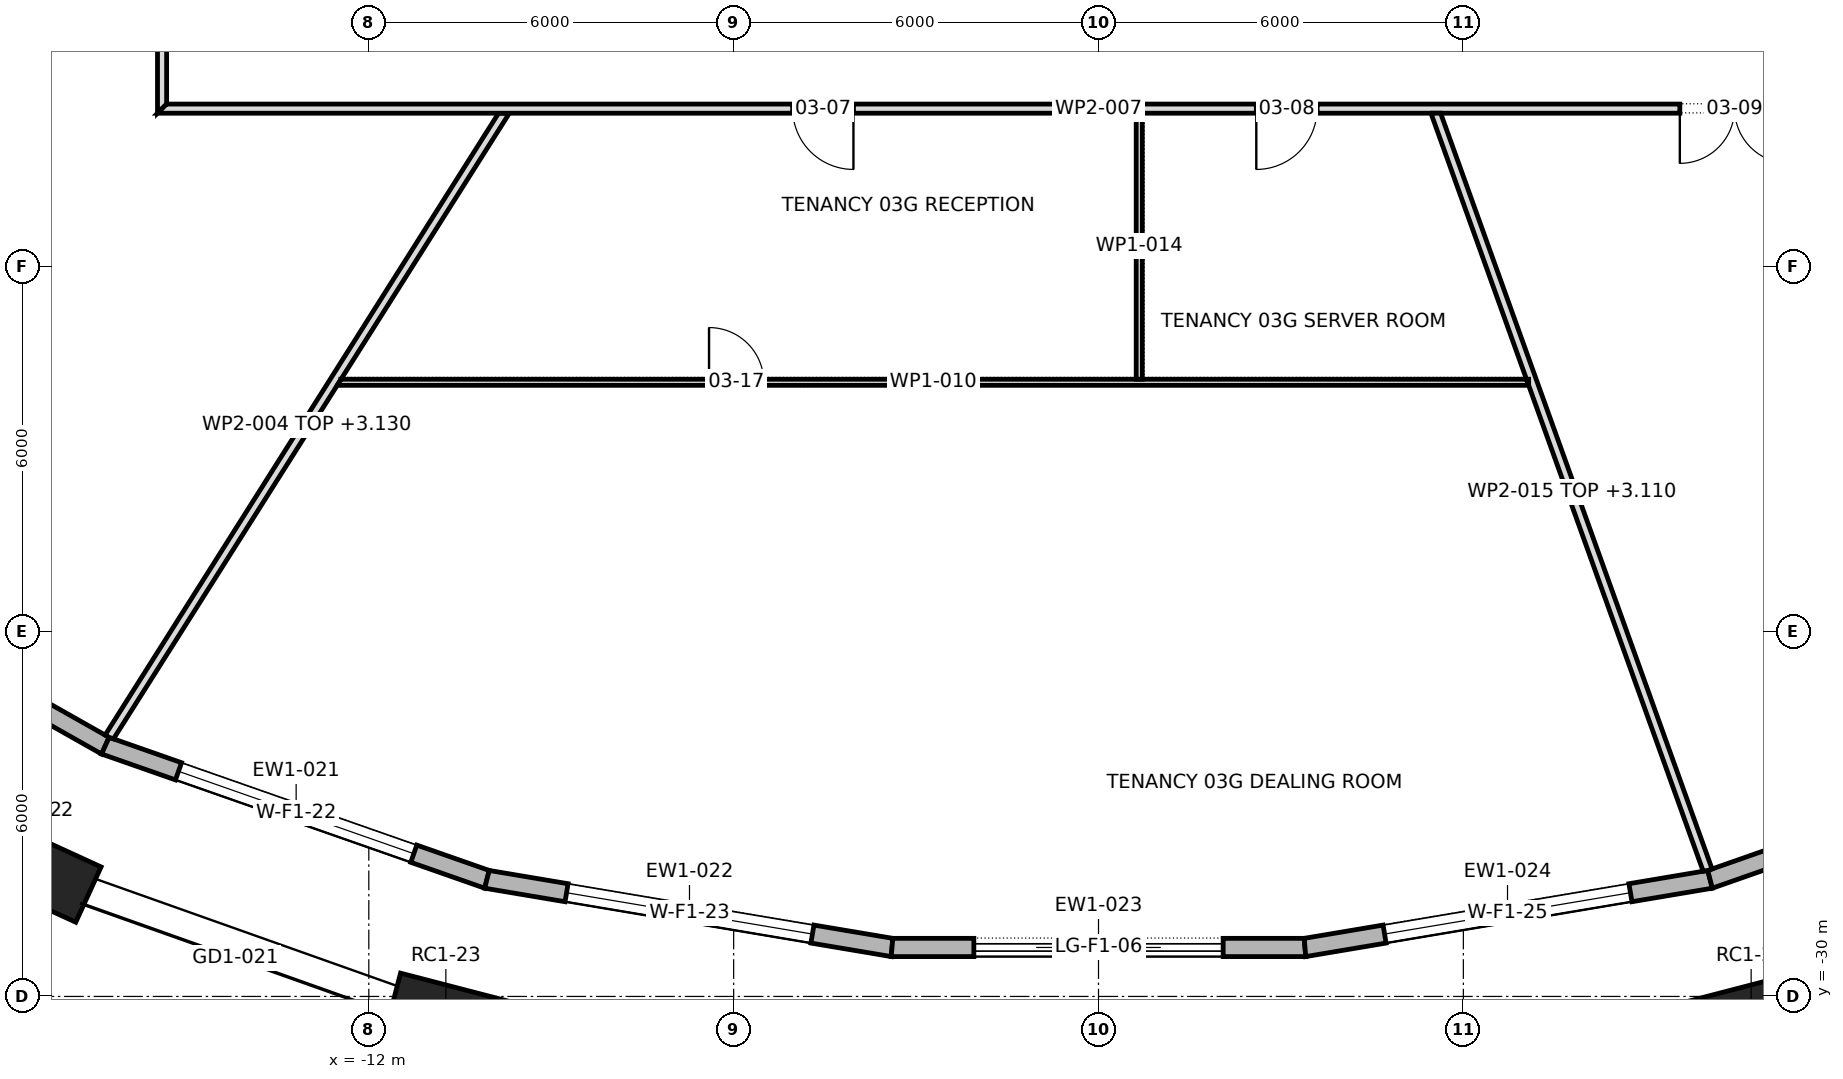
"""IFC4 building model, lengths in metres.
Left out: names, types, materials, properties, quantities, classifications, styles, units other than length and angle.
Written with IfcOpenShell. Run it as: python <this file> out.ifc"""

import sys

from ifc_helpers import new_model, si_unit, direction, frame, frame_2d, origin, origin_2d, place, context, subcontext, project, spatial, polyline, rectangle, outline, extrude, element, fill, save


model = new_model("IFC4")
c1 = context("Model", 3, precision=1e-05, world=origin(), true_north=direction((0.0, 1.0)))
c2 = subcontext(c1, "Body", "Model", "MODEL_VIEW")
j1 = project(units=[si_unit("LENGTHUNIT", "METRE"), si_unit("PLANEANGLEUNIT", "RADIAN")], contexts=[c1])
p1 = place(None, origin())
s1 = spatial("IfcSite", under=j1, at=p1, CompositionType="ELEMENT")
p2 = place(p1, origin())
s2 = spatial("IfcBuilding", under=s1, at=p2, CompositionType="ELEMENT")
p3 = place(p2, frame((0.0, 0.0, 57.1)))
s3 = spatial("IfcBuildingStorey", under=s2, at=p3, CompositionType="ELEMENT", Elevation=57.1)
for number, where, z_axis, x_axis in (
    (1, (-17.429, -27.95, 0.0), (0.0, 0.0, 1.0), (0.909, -0.417, 0.0)),
    (2, (-10.733, -30.327, 0.0), (0.0, 0.0, 1.0), (0.968, -0.252, 0.0)),
    (3, (10.733, -30.327, 0.0), (0.0, 0.0, 1.0), (0.968, 0.252, 0.0)),
):
    element("IfcColumn", number, at=place(p3, frame(where, z_axis=z_axis, x_axis=x_axis)), inside=s3, PredefinedType="COLUMN", context=c2, shape_type="SweptSolid", body=[
        extrude(rectangle(XDim=1.8, YDim=1.0, at=origin_2d()), origin(), (0.0, 0.0, 1.0), 4.2),
    ])
p4 = place(p3, frame((-21.983, -22.684, 0.0), z_axis=(0.0, 0.0, 1.0), x_axis=(0.870647609977, -0.491907246584, 0.0)))
e4 = element("IfcWall", 4, at=p4, inside=s3, PredefinedType="STANDARD", context=c2, shape_type="SweptSolid", body=[
    extrude(outline(polyline([(-0.014, -0.15), (6.503, -0.15), (6.476, 0.15), (0.014, 0.15), (-0.014, -0.15)])), origin(), (0.0, 0.0, 1.0), 3.9),
])
p5 = place(p4, frame((1.195, 0.0, 0.6)))
e5 = element("IfcOpeningElement", 5, at=p5, cuts=e4, PredefinedType="OPENING", context=c2, shape_type="SweptSolid", body=[
    extrude(rectangle(XDim=4.1, YDim=2.85, at=frame_2d((2.05, 1.425))), frame((0.0, 0.162, 0.0), z_axis=(0.0, -1.0, 0.0), x_axis=(1.0, 0.0, 0.0)), (0.0, 0.0, 1.0), 0.324),
])
p6 = place(p3, frame((-16.333, -25.876, 0.0), z_axis=(0.0, 0.0, 1.0), x_axis=(0.943790794479, -0.330543395421, 0.0)))
e6 = element("IfcWall", 6, at=p6, inside=s3, PredefinedType="STANDARD", context=c2, shape_type="SweptSolid", body=[
    extrude(outline(polyline([(-0.013, -0.15), (6.662, -0.15), (6.637, 0.15), (0.013, 0.15), (-0.013, -0.15)])), origin(), (0.0, 0.0, 1.0), 3.9),
])
p7 = place(p6, frame((1.275, 0.0, 0.6)))
e7 = element("IfcOpeningElement", 7, at=p7, cuts=e6, PredefinedType="OPENING", context=c2, shape_type="SweptSolid", body=[
    extrude(rectangle(XDim=4.1, YDim=2.85, at=frame_2d((2.05, 1.425))), frame((0.0, 0.162, 0.0), z_axis=(0.0, -1.0, 0.0), x_axis=(1.0, 0.0, 0.0)), (0.0, 0.0, 1.0), 0.324),
])
p8 = place(p3, frame((-10.057, -28.074, 0.0), z_axis=(0.0, 0.0, 1.0), x_axis=(0.986149614624, -0.165858185139, 0.0)))
e8 = element("IfcWall", 8, at=p8, inside=s3, PredefinedType="STANDARD", context=c2, shape_type="SweptSolid", body=[
    extrude(outline(polyline([(-0.013, -0.15), (6.767, -0.15), (6.742, 0.15), (0.013, 0.15), (-0.013, -0.15)])), origin(), (0.0, 0.0, 1.0), 3.9),
])
p9 = place(p8, frame((1.327, 0.0, 0.6)))
e9 = element("IfcOpeningElement", 9, at=p9, cuts=e8, PredefinedType="OPENING", context=c2, shape_type="SweptSolid", body=[
    extrude(rectangle(XDim=4.1, YDim=2.85, at=frame_2d((2.05, 1.425))), frame((0.0, 0.162, 0.0), z_axis=(0.0, -1.0, 0.0), x_axis=(1.0, 0.0, 0.0)), (0.0, 0.0, 1.0), 0.324),
])
p10 = place(p3, frame((-3.396, -29.195, 0.0), z_axis=(0.0, 0.0, 1.0), x_axis=(1.0, 0.0, 0.0)))
e10 = element("IfcWall", 10, at=p10, inside=s3, PredefinedType="STANDARD", context=c2, shape_type="SweptSolid", body=[
    extrude(outline(polyline([(-0.012, -0.15), (6.803, -0.15), (6.779, 0.15), (0.012, 0.15), (-0.012, -0.15)])), origin(), (0.0, 0.0, 1.0), 3.9),
])
p11 = place(p10, frame((1.346, 0.0, 0.0)))
e11 = element("IfcOpeningElement", 11, at=p11, cuts=e10, PredefinedType="OPENING", context=c2, shape_type="SweptSolid", body=[
    extrude(rectangle(XDim=4.1, YDim=3.45, at=frame_2d((2.05, 1.725))), frame((0.0, 0.162, 0.0), z_axis=(0.0, -1.0, 0.0), x_axis=(1.0, 0.0, 0.0)), (0.0, 0.0, 1.0), 0.324),
])
p12 = place(p3, frame((3.396, -29.195, 0.0), z_axis=(0.0, 0.0, 1.0), x_axis=(0.986149614624, 0.165858185139, 0.0)))
e12 = element("IfcWall", 12, at=p12, inside=s3, PredefinedType="STANDARD", context=c2, shape_type="SweptSolid", body=[
    extrude(outline(polyline([(-0.012, -0.15), (6.768, -0.15), (6.742, 0.15), (0.012, 0.15), (-0.012, -0.15)])), origin(), (0.0, 0.0, 1.0), 3.9),
])
p13 = place(p12, frame((1.327, 0.0, 0.6)))
e13 = element("IfcOpeningElement", 13, at=p13, cuts=e12, PredefinedType="OPENING", context=c2, shape_type="SweptSolid", body=[
    extrude(rectangle(XDim=4.1, YDim=2.85, at=frame_2d((2.05, 1.425))), frame((0.0, 0.162, 0.0), z_axis=(0.0, -1.0, 0.0), x_axis=(1.0, 0.0, 0.0)), (0.0, 0.0, 1.0), 0.324),
])
p14 = place(p3, frame((10.057, -28.074, 0.0), z_axis=(0.0, 0.0, 1.0), x_axis=(0.943790794479, 0.330543395421, 0.0)))
e14 = element("IfcWall", 14, at=p14, inside=s3, PredefinedType="STANDARD", context=c2, shape_type="SweptSolid", body=[
    extrude(outline(polyline([(-0.013, -0.15), (6.663, -0.15), (6.636, 0.15), (0.013, 0.15), (-0.013, -0.15)])), origin(), (0.0, 0.0, 1.0), 3.9),
])
p15 = place(p14, frame((1.275, 0.0, 0.6)))
e15 = element("IfcOpeningElement", 15, at=p15, cuts=e14, PredefinedType="OPENING", context=c2, shape_type="SweptSolid", body=[
    extrude(rectangle(XDim=4.1, YDim=2.85, at=frame_2d((2.05, 1.425))), frame((0.0, 0.162, 0.0), z_axis=(0.0, -1.0, 0.0), x_axis=(1.0, 0.0, 0.0)), (0.0, 0.0, 1.0), 0.324),
])
p16 = place(p3, frame((-16.273, -25.742, 0.0), z_axis=(0.0, 0.0, 1.0), x_axis=(0.534654841392, 0.845070529942, 0.0)))
e16 = element("IfcWall", 16, at=p16, inside=s3, PredefinedType="PARTITIONING", context=c2, shape_type="SweptSolid", body=[
    extrude(outline(polyline([(0.021, -0.075), (1.769, -0.075), (3.517, -0.075), (5.265, -0.075), (7.013, -0.075), (7.018, -0.072), (7.019, -0.075), (8.745, -0.075), (10.471, -0.075), (12.196, -0.075), (12.196, -0.075), (12.102, 0.075), (10.373, 0.075), (8.644, 0.075), (6.915, 0.075), (5.186, 0.075), (3.458, 0.075), (1.729, 0.075), (0.0, 0.075), (0.0, 0.071), (0.004, -0.0), (0.021, -0.075)])), origin(), (0.0, 0.0, 1.0), 3.13),
])
p17 = place(p3, frame((-15.4, -15.475, 0.0), z_axis=(0.0, 0.0, 1.0), x_axis=(0.0, 1.0, 0.0)))
e17 = element("IfcWall", 17, at=p17, inside=s3, PredefinedType="PARTITIONING", context=c2, shape_type="SweptSolid", body=[
    extrude(outline(polyline([(0.15, -0.075), (2.066, -0.075), (3.981, -0.075), (5.897, -0.075), (7.812, -0.075), (9.728, -0.075), (11.644, -0.075), (13.56, -0.075), (15.475, -0.075), (17.391, -0.075), (19.306, -0.075), (21.222, -0.075), (23.138, -0.075), (25.053, -0.075), (26.969, -0.075), (28.885, -0.075), (30.8, -0.075), (30.95, 0.075), (29.016, 0.075), (27.081, 0.075), (25.147, 0.075), (23.212, 0.075), (21.278, 0.075), (19.344, 0.075), (17.409, 0.075), (15.475, 0.075), (13.541, 0.075), (11.606, 0.075), (9.672, 0.075), (7.738, 0.075), (5.803, 0.075), (3.869, 0.075), (1.935, 0.075), (0.0, 0.075), (0.15, -0.075)])), origin(), (0.0, 0.0, 1.0), 3.9),
])
p18 = place(p17, frame((25.755, 0.0, 0.0)))
e18 = element("IfcOpeningElement", 18, at=p18, cuts=e17, PredefinedType="OPENING", context=c2, shape_type="SweptSolid", body=[
    extrude(rectangle(XDim=1.8, YDim=2.1, at=frame_2d((0.9, 1.05))), frame((0.0, 0.087, 0.0), z_axis=(0.0, -1.0, 0.0), x_axis=(1.0, 0.0, 0.0)), (0.0, 0.0, 1.0), 0.174),
])
p19 = place(p17, frame((18.695, 0.0, 0.0)))
e19 = element("IfcOpeningElement", 19, at=p19, cuts=e17, PredefinedType="OPENING", context=c2, shape_type="SweptSolid", body=[
    extrude(rectangle(XDim=1.8, YDim=2.1, at=frame_2d((0.9, 1.05))), frame((0.0, 0.087, 0.0), z_axis=(0.0, -1.0, 0.0), x_axis=(1.0, 0.0, 0.0)), (0.0, 0.0, 1.0), 0.174),
])
p20 = place(p17, frame((12.135, 0.0, 0.0)))
e20 = element("IfcOpeningElement", 20, at=p20, cuts=e17, PredefinedType="OPENING", context=c2, shape_type="SweptSolid", body=[
    extrude(rectangle(XDim=1.0, YDim=2.1, at=frame_2d((0.5, 1.05))), frame((0.0, 0.087, 0.0), z_axis=(0.0, -1.0, 0.0), x_axis=(1.0, 0.0, 0.0)), (0.0, 0.0, 1.0), 0.174),
])
p21 = place(p17, frame((3.395, 0.0, 0.0)))
e21 = element("IfcOpeningElement", 21, at=p21, cuts=e17, PredefinedType="OPENING", context=c2, shape_type="SweptSolid", body=[
    extrude(rectangle(XDim=1.8, YDim=2.1, at=frame_2d((0.9, 1.05))), frame((0.0, 0.087, 0.0), z_axis=(0.0, -1.0, 0.0), x_axis=(1.0, 0.0, 0.0)), (0.0, 0.0, 1.0), 0.174),
])
p22 = place(p3, frame((-15.475, -15.4, 0.0), z_axis=(0.0, 0.0, 1.0), x_axis=(1.0, 0.0, 0.0)))
e22 = element("IfcWall", 22, at=p22, inside=s3, PredefinedType="PARTITIONING", context=c2, shape_type="SweptSolid", body=[
    extrude(outline(polyline([(0.0, -0.075), (1.935, -0.075), (3.869, -0.075), (5.803, -0.075), (7.738, -0.075), (9.672, -0.075), (11.606, -0.075), (13.541, -0.075), (15.475, -0.075), (17.409, -0.075), (19.344, -0.075), (21.278, -0.075), (23.212, -0.075), (25.147, -0.075), (27.081, -0.075), (29.016, -0.075), (30.95, -0.075), (30.8, 0.075), (28.885, 0.075), (26.969, 0.075), (25.053, 0.075), (23.138, 0.075), (21.222, 0.075), (19.306, 0.075), (17.391, 0.075), (15.475, 0.075), (13.56, 0.075), (11.644, 0.075), (9.728, 0.075), (7.812, 0.075), (5.897, 0.075), (3.981, 0.075), (2.066, 0.075), (0.15, 0.075), (0.0, -0.075)])), origin(), (0.0, 0.0, 1.0), 3.9),
])
p23 = place(p22, frame((10.445, 0.0, 0.0)))
e23 = element("IfcOpeningElement", 23, at=p23, cuts=e22, PredefinedType="OPENING", context=c2, shape_type="SweptSolid", body=[
    extrude(rectangle(XDim=1.0, YDim=2.1, at=frame_2d((0.5, 1.05))), frame((0.0, 0.087, 0.0), z_axis=(0.0, -1.0, 0.0), x_axis=(1.0, 0.0, 0.0)), (0.0, 0.0, 1.0), 0.174),
])
p24 = place(p22, frame((18.07, 0.0, 0.0)))
e24 = element("IfcOpeningElement", 24, at=p24, cuts=e22, PredefinedType="OPENING", context=c2, shape_type="SweptSolid", body=[
    extrude(rectangle(XDim=1.0, YDim=2.1, at=frame_2d((0.5, 1.05))), frame((0.0, 0.087, 0.0), z_axis=(0.0, -1.0, 0.0), x_axis=(1.0, 0.0, 0.0)), (0.0, 0.0, 1.0), 0.174),
])
p25 = place(p22, frame((25.035, 0.0, 0.0)))
e25 = element("IfcOpeningElement", 25, at=p25, cuts=e22, PredefinedType="OPENING", context=c2, shape_type="SweptSolid", body=[
    extrude(rectangle(XDim=1.8, YDim=2.1, at=frame_2d((0.9, 1.05))), frame((0.0, 0.087, 0.0), z_axis=(0.0, -1.0, 0.0), x_axis=(1.0, 0.0, 0.0)), (0.0, 0.0, 1.0), 0.174),
])
p26 = place(p3, frame((-12.52, -19.9, 0.0), z_axis=(0.0, 0.0, 1.0), x_axis=(1.0, 0.0, 0.0)))
e26 = element("IfcWall", 26, at=p26, inside=s3, PredefinedType="PARTITIONING", context=c2, shape_type="SweptSolid", body=[
    extrude(outline(polyline([(19.594, -0.05), (19.594, -0.049), (19.558, 0.05), (17.978, 0.05), (16.399, 0.05), (14.819, 0.05), (13.24, 0.05), (13.24, 0.05), (13.14, 0.05), (13.14, 0.05), (11.271, 0.05), (9.403, 0.05), (7.535, 0.05), (5.667, 0.05), (3.799, 0.05), (1.931, 0.05), (0.063, 0.05), (0.0, -0.05), (0.0, -0.05), (1.959, -0.05), (3.919, -0.05), (5.878, -0.05), (7.837, -0.05), (9.797, -0.05), (11.756, -0.05), (13.715, -0.05), (15.675, -0.05), (17.634, -0.05), (19.594, -0.05)])), origin(), (0.0, 0.0, 1.0), 3.9),
])
p27 = place(p26, frame((6.115, 0.0, 0.0)))
e27 = element("IfcOpeningElement", 27, at=p27, cuts=e26, PredefinedType="OPENING", context=c2, shape_type="SweptSolid", body=[
    extrude(rectangle(XDim=0.9, YDim=2.1, at=frame_2d((0.45, 1.05))), frame((0.0, 0.062, 0.0), z_axis=(0.0, -1.0, 0.0), x_axis=(1.0, 0.0, 0.0)), (0.0, 0.0, 1.0), 0.124),
])
p28 = place(p3, frame((0.67, -15.475, 0.0), z_axis=(0.0, 0.0, 1.0), x_axis=(0.0, -1.0, 0.0)))
e28 = element("IfcWall", 28, at=p28, inside=s3, PredefinedType="PARTITIONING", context=c2, shape_type="SweptSolid", body=[
    extrude(rectangle(XDim=4.375, YDim=0.1, at=frame_2d((2.188, 0.0))), origin(), (0.0, 0.0, 1.0), 3.9),
])
p29 = place(p3, frame((5.538, -15.45, 0.0), z_axis=(0.0, 0.0, 1.0), x_axis=(0.337991057854, -0.941149321208, 0.0)))
e29 = element("IfcWall", 29, at=p29, inside=s3, PredefinedType="PARTITIONING", context=c2, shape_type="SweptSolid", body=[
    extrude(outline(polyline([(0.0, -0.075), (1.549, -0.075), (3.099, -0.075), (4.648, -0.075), (4.66, -0.042), (4.754, -0.075), (6.452, -0.075), (8.15, -0.075), (9.849, -0.075), (11.547, -0.075), (13.245, -0.075), (13.259, 0.0), (13.259, 0.041), (13.259, 0.075), (11.373, 0.075), (9.486, 0.075), (7.6, 0.075), (5.713, 0.075), (3.826, 0.075), (1.94, 0.075), (0.053, 0.075), (0.0, -0.074), (0.0, -0.075)])), origin(), (0.0, 0.0, 1.0), 3.11),
])
p30 = place(p7, origin())
e30 = element("IfcWindow", 30, at=p30, inside=s3, PartitioningType="TRIPLE_PANEL_VERTICAL", PredefinedType="WINDOW", context=c2, shape_type="SweptSolid", body=[
    extrude(rectangle(XDim=4.1, YDim=2.85, at=frame_2d((2.05, 1.425))), frame((0.0, 0.03, 0.0), z_axis=(0.0, -1.0, 0.0), x_axis=(1.0, 0.0, 0.0)), (0.0, 0.0, 1.0), 0.06),
])
fill(e7, e30)
p31 = place(p9, origin())
e31 = element("IfcWindow", 31, at=p31, inside=s3, PartitioningType="TRIPLE_PANEL_VERTICAL", PredefinedType="WINDOW", context=c2, shape_type="SweptSolid", body=[
    extrude(rectangle(XDim=4.1, YDim=2.85, at=frame_2d((2.05, 1.425))), frame((0.0, 0.03, 0.0), z_axis=(0.0, -1.0, 0.0), x_axis=(1.0, 0.0, 0.0)), (0.0, 0.0, 1.0), 0.06),
])
fill(e9, e31)
p32 = place(p11, origin())
e32 = element("IfcDoor", 32, at=p32, inside=s3, OperationType="DOUBLE_DOOR_SLIDING", PredefinedType="DOOR", context=c2, shape_type="SweptSolid", body=[
    extrude(rectangle(XDim=4.1, YDim=3.45, at=frame_2d((2.05, 1.725))), frame((0.0, 0.025, 0.0), z_axis=(0.0, -1.0, 0.0), x_axis=(1.0, 0.0, 0.0)), (0.0, 0.0, 1.0), 0.05),
])
fill(e11, e32)
p33 = place(p13, origin())
e33 = element("IfcWindow", 33, at=p33, inside=s3, PartitioningType="TRIPLE_PANEL_VERTICAL", PredefinedType="WINDOW", context=c2, shape_type="SweptSolid", body=[
    extrude(rectangle(XDim=4.1, YDim=2.85, at=frame_2d((2.05, 1.425))), frame((0.0, 0.03, 0.0), z_axis=(0.0, -1.0, 0.0), x_axis=(1.0, 0.0, 0.0)), (0.0, 0.0, 1.0), 0.06),
])
fill(e13, e33)
p34 = place(p23, frame((1.0, 0.0, 0.0), z_axis=(0.0, 0.0, 1.0), x_axis=(-1.0, 0.0, 0.0)))
e34 = element("IfcDoor", 34, at=p34, inside=s3, OperationType="SINGLE_SWING_RIGHT", PredefinedType="DOOR", context=c2, shape_type="SweptSolid", body=[
    extrude(rectangle(XDim=1.0, YDim=2.1, at=frame_2d((0.5, 1.05))), frame((0.0, 0.025, 0.0), z_axis=(0.0, -1.0, 0.0), x_axis=(1.0, 0.0, 0.0)), (0.0, 0.0, 1.0), 0.05),
])
fill(e23, e34)
p35 = place(p24, frame((1.0, 0.0, 0.0), z_axis=(0.0, 0.0, 1.0), x_axis=(-1.0, 0.0, 0.0)))
e35 = element("IfcDoor", 35, at=p35, inside=s3, OperationType="SINGLE_SWING_LEFT", PredefinedType="DOOR", context=c2, shape_type="SweptSolid", body=[
    extrude(rectangle(XDim=1.0, YDim=2.1, at=frame_2d((0.5, 1.05))), frame((0.0, 0.025, 0.0), z_axis=(0.0, -1.0, 0.0), x_axis=(1.0, 0.0, 0.0)), (0.0, 0.0, 1.0), 0.05),
])
fill(e24, e35)
p36 = place(p25, frame((1.8, 0.0, 0.0), z_axis=(0.0, 0.0, 1.0), x_axis=(-1.0, 0.0, 0.0)))
e36 = element("IfcDoor", 36, at=p36, inside=s3, OperationType="DOUBLE_DOOR_SINGLE_SWING", PredefinedType="DOOR", context=c2, shape_type="SweptSolid", body=[
    extrude(rectangle(XDim=1.8, YDim=2.1, at=frame_2d((0.9, 1.05))), frame((0.0, 0.025, 0.0), z_axis=(0.0, -1.0, 0.0), x_axis=(1.0, 0.0, 0.0)), (0.0, 0.0, 1.0), 0.05),
])
fill(e25, e36)
p37 = place(p27, origin())
e37 = element("IfcDoor", 37, at=p37, inside=s3, OperationType="SINGLE_SWING_RIGHT", PredefinedType="DOOR", context=c2, shape_type="SweptSolid", body=[
    extrude(rectangle(XDim=0.9, YDim=2.1, at=frame_2d((0.45, 1.05))), frame((0.0, 0.025, 0.0), z_axis=(0.0, -1.0, 0.0), x_axis=(1.0, 0.0, 0.0)), (0.0, 0.0, 1.0), 0.05),
])
fill(e27, e37)
save(model, sys.argv[1])
